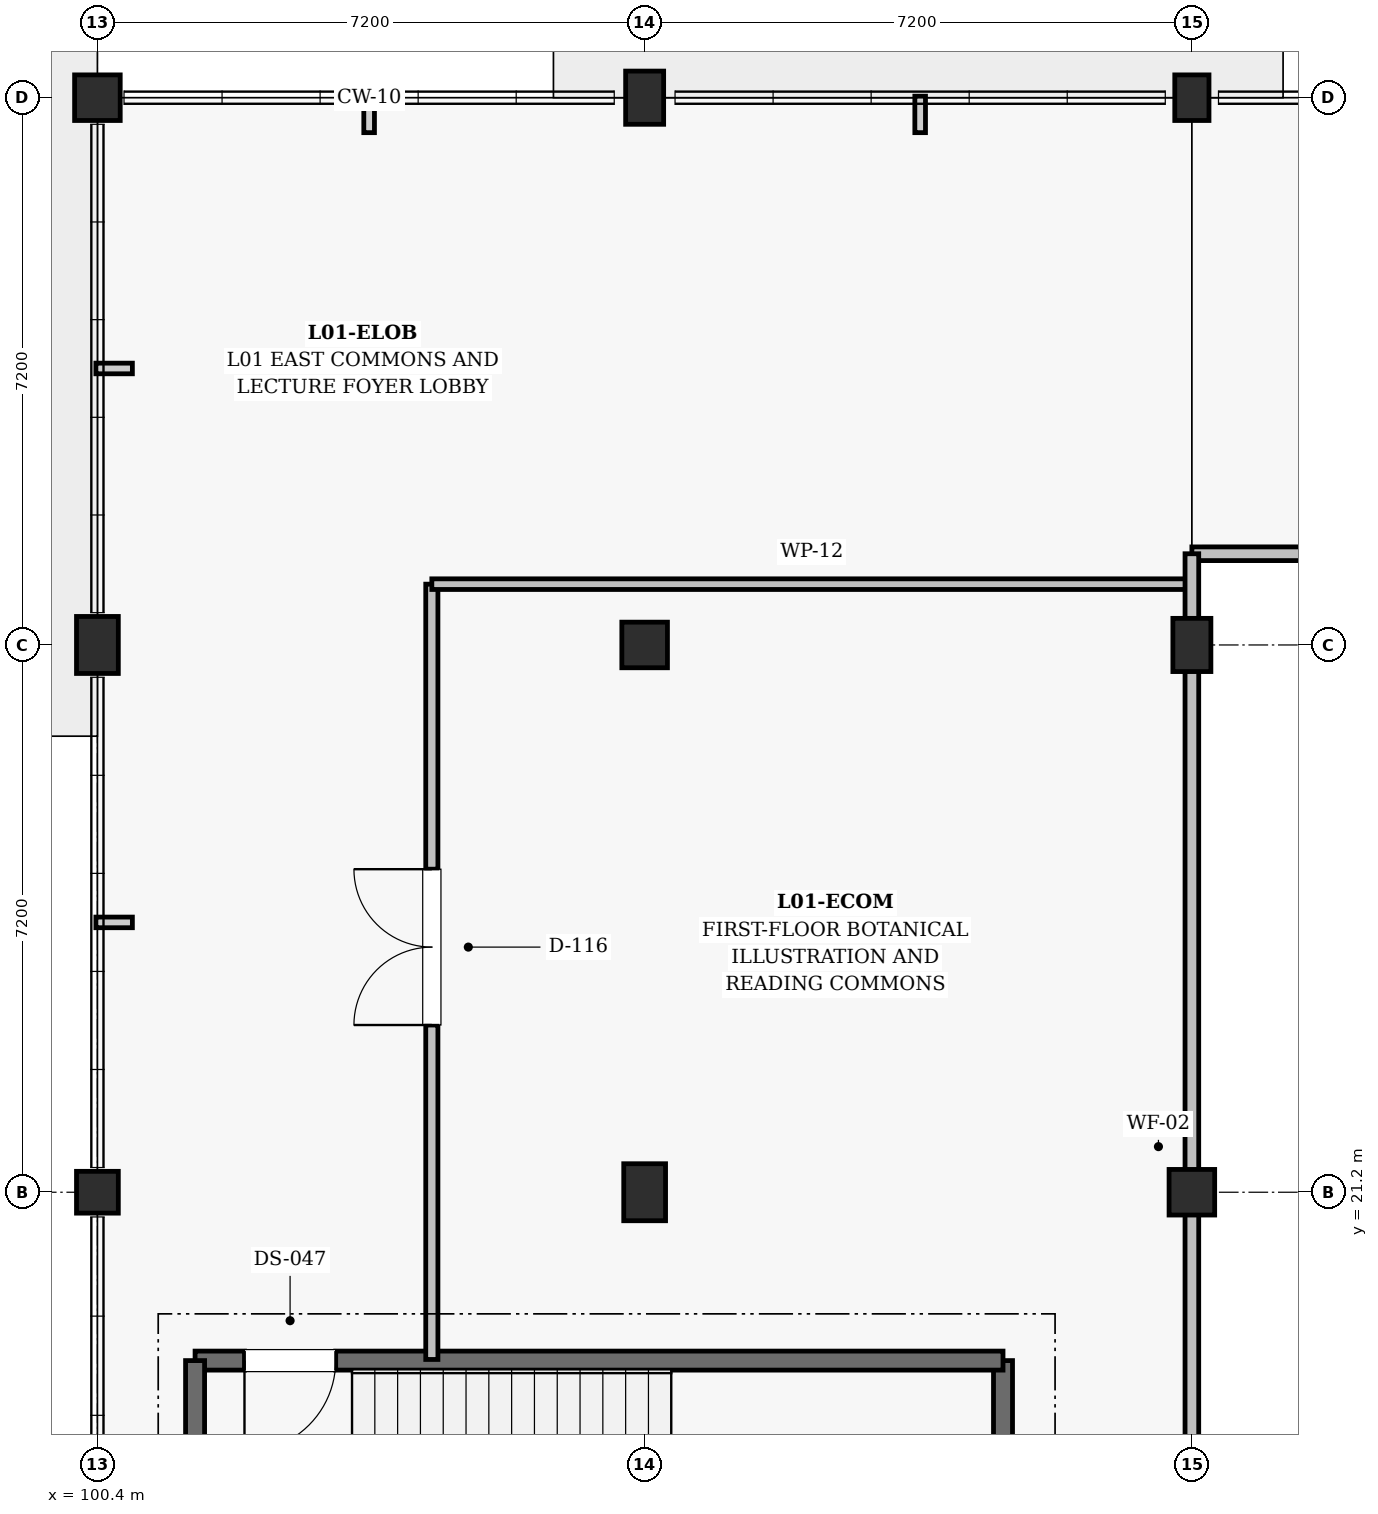
"""IFC4 building model, lengths in metres.
Left out: names, types, materials, properties, quantities, classifications, styles, units other than length and angle.
Written with IfcOpenShell. Run it as: python <this file> out.ifc"""

import sys

from ifc_helpers import new_model, si_unit, direction, frame, frame_2d, origin, origin_2d, place, context, subcontext, project, spatial, rectangle, extrude, element, fill, save


model = new_model("IFC4")
c1 = context("Model", 3, precision=1e-05, world=origin(), true_north=direction((0.0, 1.0)))
c2 = subcontext(c1, "Body", "Model", "MODEL_VIEW")
j1 = project(units=[si_unit("LENGTHUNIT", "METRE"), si_unit("PLANEANGLEUNIT", "RADIAN")], contexts=[c1])
p1 = place(None, origin())
s1 = spatial("IfcSite", under=j1, at=p1, CompositionType="ELEMENT")
p2 = place(p1, origin())
s2 = spatial("IfcBuilding", under=s1, at=p2, CompositionType="ELEMENT")
p3 = place(p2, frame((0.0, 0.0, 5.4)))
s3 = spatial("IfcBuildingStorey", under=s2, at=p3, CompositionType="ELEMENT", Elevation=5.4)
p4 = place(p3, frame((100.4, 21.2, 0.0), z_axis=(0.0, 0.0, 1.0), x_axis=(1.0, 0.0, 0.0)))
e1 = element("IfcColumn", 1, at=p4, inside=s3, PredefinedType="COLUMN", context=c2, shape_type="SweptSolid", body=[
    extrude(rectangle(XDim=0.55, YDim=0.55, at=origin_2d()), origin(), (0.0, 0.0, 1.0), 4.5),
])
p5 = place(p3, frame((100.4, 28.4, 0.0), z_axis=(0.0, 0.0, 1.0), x_axis=(1.0, 0.0, 0.0)))
e2 = element("IfcColumn", 2, at=p5, inside=s3, PredefinedType="COLUMN", context=c2, shape_type="SweptSolid", body=[
    extrude(rectangle(XDim=0.55, YDim=0.75, at=origin_2d()), origin(), (0.0, 0.0, 1.0), 4.5),
])
p6 = place(p3, frame((100.4, 35.6, 0.0), z_axis=(0.0, 0.0, 1.0), x_axis=(1.0, 0.0, 0.0)))
e3 = element("IfcColumn", 3, at=p6, inside=s3, PredefinedType="COLUMN", context=c2, shape_type="SweptSolid", body=[
    extrude(rectangle(XDim=0.6, YDim=0.6, at=origin_2d()), origin(), (0.0, 0.0, 1.0), 4.5),
])
p7 = place(p3, frame((107.6, 21.2, 0.0), z_axis=(0.0, 0.0, 1.0), x_axis=(1.0, 0.0, 0.0)))
e4 = element("IfcColumn", 4, at=p7, inside=s3, PredefinedType="COLUMN", context=c2, shape_type="SweptSolid", body=[
    extrude(rectangle(XDim=0.55, YDim=0.75, at=origin_2d()), origin(), (0.0, 0.0, 1.0), 4.5),
])
p8 = place(p3, frame((107.6, 28.4, 0.0), z_axis=(0.0, 0.0, 1.0), x_axis=(1.0, 0.0, 0.0)))
e5 = element("IfcColumn", 5, at=p8, inside=s3, PredefinedType="COLUMN", context=c2, shape_type="SweptSolid", body=[
    extrude(rectangle(XDim=0.6, YDim=0.6, at=origin_2d()), origin(), (0.0, 0.0, 1.0), 4.5),
])
p9 = place(p3, frame((107.6, 35.6, 0.0), z_axis=(0.0, 0.0, 1.0), x_axis=(1.0, 0.0, 0.0)))
e6 = element("IfcColumn", 6, at=p9, inside=s3, PredefinedType="COLUMN", context=c2, shape_type="SweptSolid", body=[
    extrude(rectangle(XDim=0.5, YDim=0.7, at=origin_2d()), origin(), (0.0, 0.0, 1.0), 4.5),
])
p10 = place(p3, frame((114.8, 21.2, 0.0), z_axis=(0.0, 0.0, 1.0), x_axis=(1.0, 0.0, 0.0)))
e7 = element("IfcColumn", 7, at=p10, inside=s3, PredefinedType="COLUMN", context=c2, shape_type="SweptSolid", body=[
    extrude(rectangle(XDim=0.6, YDim=0.6, at=origin_2d()), origin(), (0.0, 0.0, 1.0), 4.5),
])
p11 = place(p3, frame((114.8, 28.4, 0.0), z_axis=(0.0, 0.0, 1.0), x_axis=(1.0, 0.0, 0.0)))
e8 = element("IfcColumn", 8, at=p11, inside=s3, PredefinedType="COLUMN", context=c2, shape_type="SweptSolid", body=[
    extrude(rectangle(XDim=0.5, YDim=0.7, at=origin_2d()), origin(), (0.0, 0.0, 1.0), 4.5),
])
p12 = place(p3, frame((114.8, 35.6, 0.0), z_axis=(0.0, 0.0, 1.0), x_axis=(1.0, 0.0, 0.0)))
e9 = element("IfcColumn", 9, at=p12, inside=s3, PredefinedType="COLUMN", context=c2, shape_type="SweptSolid", body=[
    extrude(rectangle(XDim=0.45, YDim=0.6, at=origin_2d()), origin(), (0.0, 0.0, 1.0), 4.5),
])
p13 = place(p3, frame((112.315, 15.085, 0.0), z_axis=(0.0, 0.0, 1.0), x_axis=(0.0, 1.0, 0.0)))
e10 = element("IfcWall", 10, at=p13, inside=s3, PredefinedType="SHEAR", context=c2, shape_type="SweptSolid", body=[
    extrude(rectangle(XDim=3.9, YDim=0.25, at=frame_2d((1.95, 0.0))), origin(), (0.0, 0.0, 1.0), 4.215),
])
p14 = place(p3, frame((112.315, 18.985, 0.0), z_axis=(0.0, 0.0, 1.0), x_axis=(-1.0, 0.0, 0.0)))
e11 = element("IfcWall", 11, at=p14, inside=s3, PredefinedType="SHEAR", context=c2, shape_type="SweptSolid", body=[
    extrude(rectangle(XDim=10.63, YDim=0.25, at=frame_2d((5.315, 0.0))), origin(), (0.0, 0.0, 1.0), 4.215),
])
p15 = place(p14, frame((8.78, 0.0, 0.0)))
e12 = element("IfcOpeningElement", 12, at=p15, cuts=e11, PredefinedType="OPENING", context=c2, shape_type="SweptSolid", body=[
    extrude(rectangle(XDim=1.2, YDim=2.15, at=frame_2d((0.6, 1.075))), frame((0.0, 0.135, 0.0), z_axis=(0.0, -1.0, 0.0), x_axis=(1.0, 0.0, 0.0)), (0.0, 0.0, 1.0), 0.27),
])
p16 = place(p3, frame((101.685, 18.985, 0.0), z_axis=(0.0, 0.0, 1.0), x_axis=(0.0, -1.0, 0.0)))
e13 = element("IfcWall", 13, at=p16, inside=s3, PredefinedType="SHEAR", context=c2, shape_type="SweptSolid", body=[
    extrude(rectangle(XDim=3.9, YDim=0.25, at=frame_2d((1.95, 0.0))), origin(), (0.0, 0.0, 1.0), 4.215),
])
p17 = place(p3, frame((104.8, 19.0, 0.0), z_axis=(0.0, 0.0, 1.0), x_axis=(0.0, 1.0, 0.0)))
e14 = element("IfcWall", 14, at=p17, inside=s3, PredefinedType="PARTITIONING", context=c2, shape_type="SweptSolid", body=[
    extrude(rectangle(XDim=10.2, YDim=0.16, at=frame_2d((5.1, 0.0))), origin(), (0.0, 0.0, 1.0), 3.41),
])
p18 = place(p17, frame((4.4, 0.0, 0.0)))
e15 = element("IfcOpeningElement", 15, at=p18, cuts=e14, PredefinedType="OPENING", context=c2, shape_type="SweptSolid", body=[
    extrude(rectangle(XDim=2.05, YDim=2.3, at=frame_2d((1.025, 1.15))), frame((0.0, 0.09, 0.0), z_axis=(0.0, -1.0, 0.0), x_axis=(1.0, 0.0, 0.0)), (0.0, 0.0, 1.0), 0.18),
])
p19 = place(p3, frame((104.8, 29.2, 0.0), z_axis=(0.0, 0.0, 1.0), x_axis=(1.0, 0.0, 0.0)))
e16 = element("IfcWall", 16, at=p19, inside=s3, PredefinedType="PARTITIONING", context=c2, shape_type="SweptSolid", body=[
    extrude(rectangle(XDim=10.0, YDim=0.14, at=frame_2d((5.0, 0.0))), origin(), (0.0, 0.0, 1.0), 3.46),
])
p20 = place(p3, frame((114.8, 29.6, 0.0), z_axis=(0.0, 0.0, 1.0), x_axis=(1.0, 0.0, 0.0)))
e17 = element("IfcWall", 17, at=p20, inside=s3, PredefinedType="SOLIDWALL", context=c2, shape_type="SweptSolid", body=[
    extrude(rectangle(XDim=27.6, YDim=0.18, at=frame_2d((13.8, 0.0))), origin(), (0.0, 0.0, 1.0), 3.46),
])
p21 = place(p3, frame((114.8, 14.0, 0.0), z_axis=(0.0, 0.0, 1.0), x_axis=(0.0, 1.0, 0.0)))
e18 = element("IfcWall", 18, at=p21, inside=s3, PredefinedType="SOLIDWALL", context=c2, shape_type="SweptSolid", body=[
    extrude(rectangle(XDim=15.6, YDim=0.18, at=frame_2d((7.8, 0.0))), origin(), (0.0, 0.0, 1.0), 3.36),
])
p22 = place(p15, origin())
e19 = element("IfcDoor", 19, at=p22, inside=s3, OperationType="SINGLE_SWING_RIGHT", PredefinedType="DOOR", context=c2, shape_type="SweptSolid", body=[
    extrude(rectangle(XDim=1.2, YDim=2.15, at=frame_2d((0.6, 1.075))), frame((0.0, 0.025, 0.0), z_axis=(0.0, -1.0, 0.0), x_axis=(1.0, 0.0, 0.0)), (0.0, 0.0, 1.0), 0.05),
])
fill(e12, e19)
p23 = place(p18, origin())
e20 = element("IfcDoor", 20, at=p23, inside=s3, OperationType="DOUBLE_DOOR_SINGLE_SWING", PredefinedType="DOOR", context=c2, shape_type="SweptSolid", body=[
    extrude(rectangle(XDim=2.05, YDim=2.3, at=frame_2d((1.025, 1.15))), frame((0.0, 0.025, 0.0), z_axis=(0.0, -1.0, 0.0), x_axis=(1.0, 0.0, 0.0)), (0.0, 0.0, 1.0), 0.05),
])
fill(e15, e20)
save(model, sys.argv[1])
